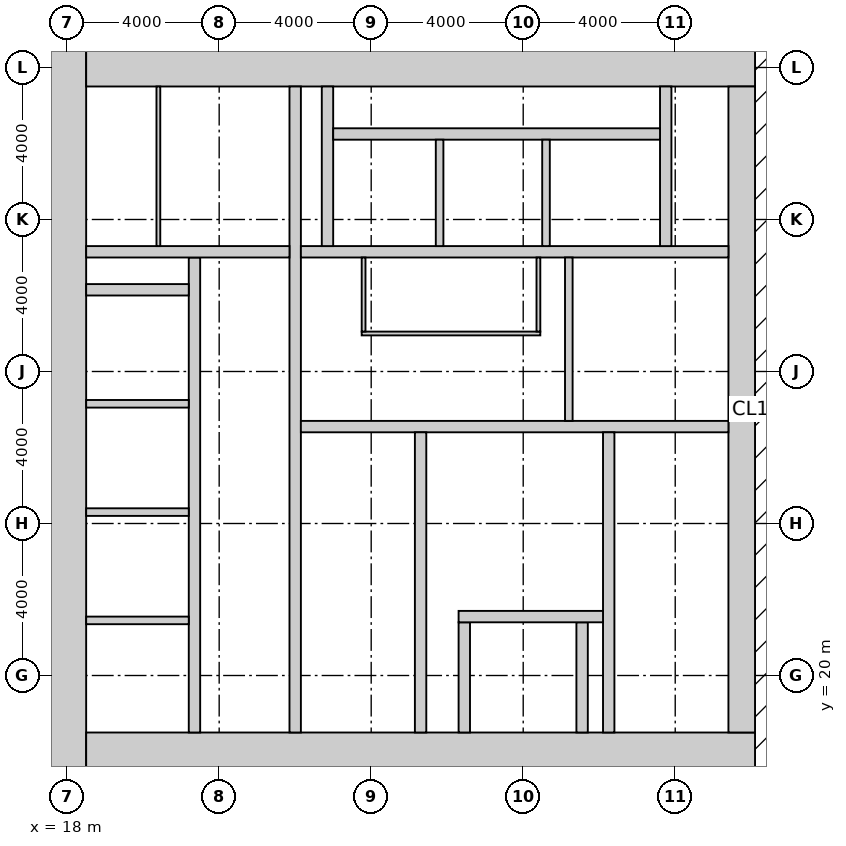
"""IFC4 building model, lengths in metres.
Left out: names, types, materials, properties, quantities, classifications, styles, units other than length and angle.
Written with IfcOpenShell. Run it as: python <this file> out.ifc"""

import sys

from ifc_helpers import new_model, si_unit, direction, frame, frame_2d, origin, place, context, subcontext, project, spatial, rectangle, extrude, element, fill, save


model = new_model("IFC4")
c1 = context("Model", 3, precision=1e-05, world=origin(), true_north=direction((0.0, 1.0)))
c2 = subcontext(c1, "Body", "Model", "MODEL_VIEW")
j1 = project(units=[si_unit("LENGTHUNIT", "METRE"), si_unit("PLANEANGLEUNIT", "RADIAN")], contexts=[c1])
p1 = place(None, origin())
s1 = spatial("IfcSite", under=j1, at=p1, CompositionType="ELEMENT")
p2 = place(p1, origin())
s2 = spatial("IfcBuilding", under=s1, at=p2, CompositionType="ELEMENT")
p3 = place(p2, frame((0.0, 0.0, 187.8)))
s3 = spatial("IfcBuildingStorey", under=s2, at=p3, CompositionType="ELEMENT", Elevation=187.8)
p4 = place(p3, frame((18.0, 17.5, -0.15), z_axis=(0.0, 0.0, 1.0), x_axis=(0.0, 1.0, 0.0)))
e1 = element("IfcWall", 1, at=p4, inside=s3, PredefinedType="SHEAR", context=c2, shape_type="SweptSolid", body=[
    extrude(rectangle(XDim=19.0, YDim=1.0, at=frame_2d((9.5, 0.0))), origin(), (0.0, 0.0, 1.0), 4.0),
])
p5 = place(p3, frame((18.5, 18.0, -0.15), z_axis=(0.0, 0.0, 1.0), x_axis=(1.0, 0.0, 0.0)))
e2 = element("IfcWall", 2, at=p5, inside=s3, PredefinedType="SHEAR", context=c2, shape_type="SweptSolid", body=[
    extrude(rectangle(XDim=17.6, YDim=1.0, at=frame_2d((8.8, 0.0))), origin(), (0.0, 0.0, 1.0), 4.0),
])
p6 = place(p5, frame((3.45, 0.0, 0.15)))
e3 = element("IfcOpeningElement", 3, at=p6, cuts=e2, PredefinedType="OPENING", context=c2, shape_type="SweptSolid", body=[
    extrude(rectangle(XDim=1.5, YDim=2.4, at=frame_2d((0.75, 1.2))), frame((0.0, 0.51, 0.0), z_axis=(0.0, -1.0, 0.0), x_axis=(1.0, 0.0, 0.0)), (0.0, 0.0, 1.0), 1.02),
])
p7 = place(p3, frame((18.5, 36.0, -0.15), z_axis=(0.0, 0.0, 1.0), x_axis=(1.0, 0.0, 0.0)))
e4 = element("IfcWall", 4, at=p7, inside=s3, PredefinedType="SHEAR", context=c2, shape_type="SweptSolid", body=[
    extrude(rectangle(XDim=17.6, YDim=1.0, at=frame_2d((8.8, 0.0))), origin(), (0.0, 0.0, 1.0), 4.0),
])
p8 = place(p3, frame((35.75, 18.5, -0.15), z_axis=(0.0, 0.0, 1.0), x_axis=(0.0, 1.0, 0.0)))
e5 = element("IfcWall", 5, at=p8, inside=s3, PredefinedType="SHEAR", context=c2, shape_type="SweptSolid", body=[
    extrude(rectangle(XDim=17.0, YDim=0.7, at=frame_2d((8.5, 0.0))), origin(), (0.0, 0.0, 1.0), 4.0),
])
p9 = place(p8, frame((9.85, 0.0, 0.15)))
e6 = element("IfcOpeningElement", 6, at=p9, cuts=e5, PredefinedType="OPENING", context=c2, shape_type="SweptSolid", body=[
    extrude(rectangle(XDim=1.0, YDim=2.2, at=frame_2d((0.5, 1.1))), frame((0.0, 0.36, 0.0), z_axis=(0.0, -1.0, 0.0), x_axis=(1.0, 0.0, 0.0)), (0.0, 0.0, 1.0), 0.72),
])
p10 = place(p3, frame((24.0, 18.5, -0.15), z_axis=(0.0, 0.0, 1.0), x_axis=(0.0, 1.0, 0.0)))
e7 = element("IfcWall", 7, at=p10, inside=s3, PredefinedType="SHEAR", context=c2, shape_type="SweptSolid", body=[
    extrude(rectangle(XDim=17.0, YDim=0.3, at=frame_2d((8.5, 0.0))), origin(), (0.0, 0.0, 1.0), 4.0),
])
p11 = place(p10, frame((9.6, 0.0, 0.15)))
e8 = element("IfcOpeningElement", 8, at=p11, cuts=e7, PredefinedType="OPENING", context=c2, shape_type="SweptSolid", body=[
    extrude(rectangle(XDim=1.5, YDim=2.4, at=frame_2d((0.75, 1.2))), frame((0.0, 0.16, 0.0), z_axis=(0.0, -1.0, 0.0), x_axis=(1.0, 0.0, 0.0)), (0.0, 0.0, 1.0), 0.32),
])
p12 = place(p3, frame((24.15, 26.55, -0.15), z_axis=(0.0, 0.0, 1.0), x_axis=(1.0, 0.0, 0.0)))
e9 = element("IfcWall", 9, at=p12, inside=s3, PredefinedType="SHEAR", context=c2, shape_type="SweptSolid", body=[
    extrude(rectangle(XDim=11.25, YDim=0.3, at=frame_2d((5.625, 0.0))), origin(), (0.0, 0.0, 1.0), 4.0),
])
p13 = place(p12, frame((9.25, 0.0, 0.15)))
e10 = element("IfcOpeningElement", 10, at=p13, cuts=e9, PredefinedType="OPENING", context=c2, shape_type="SweptSolid", body=[
    extrude(rectangle(XDim=1.0, YDim=2.2, at=frame_2d((0.5, 1.1))), frame((0.0, 0.16, 0.0), z_axis=(0.0, -1.0, 0.0), x_axis=(1.0, 0.0, 0.0)), (0.0, 0.0, 1.0), 0.32),
])
p14 = place(p12, frame((4.9, 0.0, 0.15)))
e11 = element("IfcOpeningElement", 11, at=p14, cuts=e9, PredefinedType="OPENING", context=c2, shape_type="SweptSolid", body=[
    extrude(rectangle(XDim=1.5, YDim=2.4, at=frame_2d((0.75, 1.2))), frame((0.0, 0.16, 0.0), z_axis=(0.0, -1.0, 0.0), x_axis=(1.0, 0.0, 0.0)), (0.0, 0.0, 1.0), 0.32),
])
p15 = place(p3, frame((27.3, 18.5, -0.15), z_axis=(0.0, 0.0, 1.0), x_axis=(0.0, 1.0, 0.0)))
e12 = element("IfcWall", 12, at=p15, inside=s3, PredefinedType="SHEAR", context=c2, shape_type="SweptSolid", body=[
    extrude(rectangle(XDim=7.9, YDim=0.3, at=frame_2d((3.95, 0.0))), origin(), (0.0, 0.0, 1.0), 4.0),
])
p16 = place(p15, frame((6.4, 0.0, 0.15)))
e13 = element("IfcOpeningElement", 13, at=p16, cuts=e12, PredefinedType="OPENING", context=c2, shape_type="SweptSolid", body=[
    extrude(rectangle(XDim=1.0, YDim=2.2, at=frame_2d((0.5, 1.1))), frame((0.0, 0.16, 0.0), z_axis=(0.0, -1.0, 0.0), x_axis=(1.0, 0.0, 0.0)), (0.0, 0.0, 1.0), 0.32),
])
p17 = place(p3, frame((32.25, 18.5, -0.15), z_axis=(0.0, 0.0, 1.0), x_axis=(0.0, 1.0, 0.0)))
e14 = element("IfcWall", 14, at=p17, inside=s3, PredefinedType="SHEAR", context=c2, shape_type="SweptSolid", body=[
    extrude(rectangle(XDim=7.9, YDim=0.3, at=frame_2d((3.95, 0.0))), origin(), (0.0, 0.0, 1.0), 4.0),
])
for number, where, z_axis, x_axis in (
    (15, (28.45, 18.5, -0.15), (0.0, 0.0, 1.0), (0.0, 1.0, 0.0)),
    (16, (31.55, 18.5, -0.15), (0.0, 0.0, 1.0), (0.0, 1.0, 0.0)),
):
    element("IfcWall", number, at=place(p3, frame(where, z_axis=z_axis, x_axis=x_axis)), inside=s3, PredefinedType="SHEAR", context=c2, shape_type="SweptSolid", body=[
        extrude(rectangle(XDim=2.9, YDim=0.3, at=frame_2d((1.45, 0.0))), origin(), (0.0, 0.0, 1.0), 4.0),
    ])
p18 = place(p3, frame((28.3, 21.55, -0.15), z_axis=(0.0, 0.0, 1.0), x_axis=(1.0, 0.0, 0.0)))
e17 = element("IfcWall", 17, at=p18, inside=s3, PredefinedType="SHEAR", context=c2, shape_type="SweptSolid", body=[
    extrude(rectangle(XDim=3.8, YDim=0.3, at=frame_2d((1.9, 0.0))), origin(), (0.0, 0.0, 1.0), 4.0),
])
p19 = place(p18, frame((1.05, 0.0, 0.15)))
e18 = element("IfcOpeningElement", 18, at=p19, cuts=e17, PredefinedType="OPENING", context=c2, shape_type="SweptSolid", body=[
    extrude(rectangle(XDim=1.3, YDim=2.4, at=frame_2d((0.65, 1.2))), frame((0.0, 0.16, 0.0), z_axis=(0.0, -1.0, 0.0), x_axis=(1.0, 0.0, 0.0)), (0.0, 0.0, 1.0), 0.32),
])
p20 = place(p3, frame((24.15, 31.15, -0.15), z_axis=(0.0, 0.0, 1.0), x_axis=(1.0, 0.0, 0.0)))
e19 = element("IfcWall", 19, at=p20, inside=s3, PredefinedType="SHEAR", context=c2, shape_type="SweptSolid", body=[
    extrude(rectangle(XDim=11.25, YDim=0.3, at=frame_2d((5.625, 0.0))), origin(), (0.0, 0.0, 1.0), 4.0),
])
p21 = place(p20, frame((7.25, 0.0, 0.15)))
e20 = element("IfcOpeningElement", 20, at=p21, cuts=e19, PredefinedType="OPENING", context=c2, shape_type="SweptSolid", body=[
    extrude(rectangle(XDim=1.4, YDim=2.4, at=frame_2d((0.7, 1.2))), frame((0.0, 0.16, 0.0), z_axis=(0.0, -1.0, 0.0), x_axis=(1.0, 0.0, 0.0)), (0.0, 0.0, 1.0), 0.32),
])
p22 = place(p3, frame((21.35, 18.5, -0.15), z_axis=(0.0, 0.0, 1.0), x_axis=(0.0, 1.0, 0.0)))
e21 = element("IfcWall", 21, at=p22, inside=s3, PredefinedType="SHEAR", context=c2, shape_type="SweptSolid", body=[
    extrude(rectangle(XDim=12.5, YDim=0.3, at=frame_2d((6.25, 0.0))), origin(), (0.0, 0.0, 1.0), 4.0),
])
p23 = place(p22, frame((0.875, 0.0, 0.15)))
e22 = element("IfcOpeningElement", 22, at=p23, cuts=e21, PredefinedType="OPENING", context=c2, shape_type="SweptSolid", body=[
    extrude(rectangle(XDim=1.1, YDim=2.2, at=frame_2d((0.55, 1.1))), frame((0.0, 0.16, 0.0), z_axis=(0.0, -1.0, 0.0), x_axis=(1.0, 0.0, 0.0)), (0.0, 0.0, 1.0), 0.32),
])
p24 = place(p22, frame((3.825, 0.0, 0.15)))
e23 = element("IfcOpeningElement", 23, at=p24, cuts=e21, PredefinedType="OPENING", context=c2, shape_type="SweptSolid", body=[
    extrude(rectangle(XDim=1.1, YDim=2.2, at=frame_2d((0.55, 1.1))), frame((0.0, 0.16, 0.0), z_axis=(0.0, -1.0, 0.0), x_axis=(1.0, 0.0, 0.0)), (0.0, 0.0, 1.0), 0.32),
])
p25 = place(p22, frame((6.675, 0.0, 0.15)))
e24 = element("IfcOpeningElement", 24, at=p25, cuts=e21, PredefinedType="OPENING", context=c2, shape_type="SweptSolid", body=[
    extrude(rectangle(XDim=1.1, YDim=2.2, at=frame_2d((0.55, 1.1))), frame((0.0, 0.16, 0.0), z_axis=(0.0, -1.0, 0.0), x_axis=(1.0, 0.0, 0.0)), (0.0, 0.0, 1.0), 0.32),
])
p26 = place(p22, frame((9.575, 0.0, 0.15)))
e25 = element("IfcOpeningElement", 25, at=p26, cuts=e21, PredefinedType="OPENING", context=c2, shape_type="SweptSolid", body=[
    extrude(rectangle(XDim=1.1, YDim=2.2, at=frame_2d((0.55, 1.1))), frame((0.0, 0.16, 0.0), z_axis=(0.0, -1.0, 0.0), x_axis=(1.0, 0.0, 0.0)), (0.0, 0.0, 1.0), 0.32),
])
p27 = place(p3, frame((18.5, 31.15, -0.15), z_axis=(0.0, 0.0, 1.0), x_axis=(1.0, 0.0, 0.0)))
e26 = element("IfcWall", 26, at=p27, inside=s3, PredefinedType="SHEAR", context=c2, shape_type="SweptSolid", body=[
    extrude(rectangle(XDim=5.35, YDim=0.3, at=frame_2d((2.675, 0.0))), origin(), (0.0, 0.0, 1.0), 4.0),
])
p28 = place(p27, frame((3.4, 0.0, 0.15)))
e27 = element("IfcOpeningElement", 27, at=p28, cuts=e26, PredefinedType="OPENING", context=c2, shape_type="SweptSolid", body=[
    extrude(rectangle(XDim=1.0, YDim=2.2, at=frame_2d((0.5, 1.1))), frame((0.0, 0.16, 0.0), z_axis=(0.0, -1.0, 0.0), x_axis=(1.0, 0.0, 0.0)), (0.0, 0.0, 1.0), 0.32),
])
p29 = place(p3, frame((18.5, 30.15, -0.15), z_axis=(0.0, 0.0, 1.0), x_axis=(1.0, 0.0, 0.0)))
e28 = element("IfcWall", 28, at=p29, inside=s3, PredefinedType="SHEAR", context=c2, shape_type="SweptSolid", body=[
    extrude(rectangle(XDim=2.7, YDim=0.3, at=frame_2d((1.35, 0.0))), origin(), (0.0, 0.0, 1.0), 4.0),
])
for number, where, z_axis, x_axis in (
    (29, (24.85, 31.3, -0.15), (0.0, 0.0, 1.0), (0.0, 1.0, 0.0)),
    (30, (33.75, 31.3, -0.15), (0.0, 0.0, 1.0), (0.0, 1.0, 0.0)),
):
    element("IfcWall", number, at=place(p3, frame(where, z_axis=z_axis, x_axis=x_axis)), inside=s3, PredefinedType="SHEAR", context=c2, shape_type="SweptSolid", body=[
        extrude(rectangle(XDim=4.2, YDim=0.3, at=frame_2d((2.1, 0.0))), origin(), (0.0, 0.0, 1.0), 4.0),
    ])
p30 = place(p3, frame((25.0, 34.25, -0.15), z_axis=(0.0, 0.0, 1.0), x_axis=(1.0, 0.0, 0.0)))
e31 = element("IfcWall", 31, at=p30, inside=s3, PredefinedType="SHEAR", context=c2, shape_type="SweptSolid", body=[
    extrude(rectangle(XDim=8.6, YDim=0.3, at=frame_2d((4.3, 0.0))), origin(), (0.0, 0.0, 1.0), 4.0),
])
for number, where, z_axis, x_axis in (
    (32, (27.8, 31.3, -0.15), (0.0, 0.0, 1.0), (0.0, 1.0, 0.0)),
    (33, (30.6, 31.3, -0.15), (0.0, 0.0, 1.0), (0.0, 1.0, 0.0)),
):
    element("IfcWall", number, at=place(p3, frame(where, z_axis=z_axis, x_axis=x_axis)), inside=s3, PredefinedType="SOLIDWALL", context=c2, shape_type="SweptSolid", body=[
        extrude(rectangle(XDim=2.8, YDim=0.2, at=frame_2d((1.4, 0.0))), origin(), (0.0, 0.0, 1.0), 4.0),
    ])
for number, where, z_axis, x_axis in (
    (34, (18.5, 21.45, -0.15), (0.0, 0.0, 1.0), (1.0, 0.0, 0.0)),
    (35, (18.5, 24.3, -0.15), (0.0, 0.0, 1.0), (1.0, 0.0, 0.0)),
    (36, (18.5, 27.15, -0.15), (0.0, 0.0, 1.0), (1.0, 0.0, 0.0)),
):
    element("IfcWall", number, at=place(p3, frame(where, z_axis=z_axis, x_axis=x_axis)), inside=s3, PredefinedType="SOLIDWALL", context=c2, shape_type="SweptSolid", body=[
        extrude(rectangle(XDim=2.7, YDim=0.2, at=frame_2d((1.35, 0.0))), origin(), (0.0, 0.0, 1.0), 4.0),
    ])
p31 = place(p3, frame((31.2, 26.7, 0.0), z_axis=(0.0, 0.0, 1.0), x_axis=(0.0, 1.0, 0.0)))
e37 = element("IfcWall", 37, at=p31, inside=s3, PredefinedType="SOLIDWALL", context=c2, shape_type="SweptSolid", body=[
    extrude(rectangle(XDim=4.3, YDim=0.2, at=frame_2d((2.15, 0.0))), origin(), (0.0, 0.0, 1.0), 3.85),
])
p32 = place(p3, frame((20.4, 31.3, 0.0), z_axis=(0.0, 0.0, 1.0), x_axis=(0.0, 1.0, 0.0)))
e38 = element("IfcWall", 38, at=p32, inside=s3, PredefinedType="PARTITIONING", context=c2, shape_type="SweptSolid", body=[
    extrude(rectangle(XDim=4.2, YDim=0.1, at=frame_2d((2.1, 0.0))), origin(), (0.0, 0.0, 1.0), 3.85),
])
p33 = place(p32, frame((1.55, 0.0, 0.0)))
e39 = element("IfcOpeningElement", 39, at=p33, cuts=e38, PredefinedType="OPENING", context=c2, shape_type="SweptSolid", body=[
    extrude(rectangle(XDim=1.0, YDim=2.2, at=frame_2d((0.5, 1.1))), frame((0.0, 0.06, 0.0), z_axis=(0.0, -1.0, 0.0), x_axis=(1.0, 0.0, 0.0)), (0.0, 0.0, 1.0), 0.12),
])
p34 = place(p3, frame((25.75, 29.0, 0.0), z_axis=(0.0, 0.0, 1.0), x_axis=(1.0, 0.0, 0.0)))
e40 = element("IfcWall", 40, at=p34, inside=s3, PredefinedType="PARTITIONING", context=c2, shape_type="SweptSolid", body=[
    extrude(rectangle(XDim=4.7, YDim=0.1, at=frame_2d((2.35, 0.0))), origin(), (0.0, 0.0, 1.0), 3.85),
])
p35 = place(p34, frame((1.85, 0.0, 0.0)))
e41 = element("IfcOpeningElement", 41, at=p35, cuts=e40, PredefinedType="OPENING", context=c2, shape_type="SweptSolid", body=[
    extrude(rectangle(XDim=1.0, YDim=2.2, at=frame_2d((0.5, 1.1))), frame((0.0, 0.06, 0.0), z_axis=(0.0, -1.0, 0.0), x_axis=(1.0, 0.0, 0.0)), (0.0, 0.0, 1.0), 0.12),
])
for number, where, z_axis, x_axis in (
    (42, (25.8, 29.05, 0.0), (0.0, 0.0, 1.0), (0.0, 1.0, 0.0)),
    (43, (30.4, 29.05, 0.0), (0.0, 0.0, 1.0), (0.0, 1.0, 0.0)),
):
    element("IfcWall", number, at=place(p3, frame(where, z_axis=z_axis, x_axis=x_axis)), inside=s3, PredefinedType="PARTITIONING", context=c2, shape_type="SweptSolid", body=[
        extrude(rectangle(XDim=1.95, YDim=0.1, at=frame_2d((0.975, 0.0))), origin(), (0.0, 0.0, 1.0), 3.85),
    ])
p36 = place(p16, origin())
e44 = element("IfcDoor", 44, at=p36, inside=s3, OperationType="SINGLE_SWING_RIGHT", PredefinedType="DOOR", context=c2, shape_type="SweptSolid", body=[
    extrude(rectangle(XDim=1.0, YDim=2.2, at=frame_2d((0.5, 1.1))), frame((0.0, 0.025, 0.0), z_axis=(0.0, -1.0, 0.0), x_axis=(1.0, 0.0, 0.0)), (0.0, 0.0, 1.0), 0.05),
])
fill(e13, e44)
p37 = place(p13, frame((1.0, 0.0, 0.0), z_axis=(0.0, 0.0, 1.0), x_axis=(-1.0, 0.0, 0.0)))
e45 = element("IfcDoor", 45, at=p37, inside=s3, OperationType="SINGLE_SWING_RIGHT", PredefinedType="DOOR", context=c2, shape_type="SweptSolid", body=[
    extrude(rectangle(XDim=1.0, YDim=2.2, at=frame_2d((0.5, 1.1))), frame((0.0, 0.025, 0.0), z_axis=(0.0, -1.0, 0.0), x_axis=(1.0, 0.0, 0.0)), (0.0, 0.0, 1.0), 0.05),
])
fill(e10, e45)
p38 = place(p9, origin())
e46 = element("IfcDoor", 46, at=p38, inside=s3, OperationType="SINGLE_SWING_RIGHT", PredefinedType="DOOR", context=c2, shape_type="SweptSolid", body=[
    extrude(rectangle(XDim=1.0, YDim=2.2, at=frame_2d((0.5, 1.1))), frame((0.0, 0.025, 0.0), z_axis=(0.0, -1.0, 0.0), x_axis=(1.0, 0.0, 0.0)), (0.0, 0.0, 1.0), 0.05),
])
fill(e6, e46)
p39 = place(p14, origin())
e47 = element("IfcDoor", 47, at=p39, inside=s3, OperationType="DOUBLE_DOOR_DOUBLE_SWING", PredefinedType="DOOR", context=c2, shape_type="SweptSolid", body=[
    extrude(rectangle(XDim=1.5, YDim=2.4, at=frame_2d((0.75, 1.2))), frame((0.0, 0.025, 0.0), z_axis=(0.0, -1.0, 0.0), x_axis=(1.0, 0.0, 0.0)), (0.0, 0.0, 1.0), 0.05),
])
fill(e11, e47)
p40 = place(p11, origin())
e48 = element("IfcDoor", 48, at=p40, inside=s3, OperationType="DOUBLE_DOOR_DOUBLE_SWING", PredefinedType="DOOR", context=c2, shape_type="SweptSolid", body=[
    extrude(rectangle(XDim=1.5, YDim=2.4, at=frame_2d((0.75, 1.2))), frame((0.0, 0.025, 0.0), z_axis=(0.0, -1.0, 0.0), x_axis=(1.0, 0.0, 0.0)), (0.0, 0.0, 1.0), 0.05),
])
fill(e8, e48)
p41 = place(p28, origin())
e49 = element("IfcDoor", 49, at=p41, inside=s3, OperationType="SINGLE_SWING_LEFT", PredefinedType="DOOR", context=c2, shape_type="SweptSolid", body=[
    extrude(rectangle(XDim=1.0, YDim=2.2, at=frame_2d((0.5, 1.1))), frame((0.0, 0.025, 0.0), z_axis=(0.0, -1.0, 0.0), x_axis=(1.0, 0.0, 0.0)), (0.0, 0.0, 1.0), 0.05),
])
fill(e27, e49)
p42 = place(p33, origin())
e50 = element("IfcDoor", 50, at=p42, inside=s3, OperationType="SINGLE_SWING_LEFT", PredefinedType="DOOR", context=c2, shape_type="SweptSolid", body=[
    extrude(rectangle(XDim=1.0, YDim=2.2, at=frame_2d((0.5, 1.1))), frame((0.0, 0.025, 0.0), z_axis=(0.0, -1.0, 0.0), x_axis=(1.0, 0.0, 0.0)), (0.0, 0.0, 1.0), 0.05),
])
fill(e39, e50)
p43 = place(p35, origin())
e51 = element("IfcDoor", 51, at=p43, inside=s3, OperationType="SINGLE_SWING_LEFT", PredefinedType="DOOR", context=c2, shape_type="SweptSolid", body=[
    extrude(rectangle(XDim=1.0, YDim=2.2, at=frame_2d((0.5, 1.1))), frame((0.0, 0.025, 0.0), z_axis=(0.0, -1.0, 0.0), x_axis=(1.0, 0.0, 0.0)), (0.0, 0.0, 1.0), 0.05),
])
fill(e41, e51)
p44 = place(p6, origin())
e52 = element("IfcDoor", 52, at=p44, inside=s3, OperationType="DOUBLE_DOOR_DOUBLE_SWING", PredefinedType="DOOR", context=c2, shape_type="SweptSolid", body=[
    extrude(rectangle(XDim=1.5, YDim=2.4, at=frame_2d((0.75, 1.2))), frame((0.0, 0.025, 0.0), z_axis=(0.0, -1.0, 0.0), x_axis=(1.0, 0.0, 0.0)), (0.0, 0.0, 1.0), 0.05),
])
fill(e3, e52)
p45 = place(p19, origin())
e53 = element("IfcDoor", 53, at=p45, inside=s3, OperationType="DOUBLE_DOOR_SLIDING", PredefinedType="DOOR", context=c2, shape_type="SweptSolid", body=[
    extrude(rectangle(XDim=1.3, YDim=2.4, at=frame_2d((0.65, 1.2))), frame((0.0, 0.025, 0.0), z_axis=(0.0, -1.0, 0.0), x_axis=(1.0, 0.0, 0.0)), (0.0, 0.0, 1.0), 0.05),
])
fill(e18, e53)
p46 = place(p21, origin())
e54 = element("IfcDoor", 54, at=p46, inside=s3, OperationType="DOUBLE_DOOR_SLIDING", PredefinedType="DOOR", context=c2, shape_type="SweptSolid", body=[
    extrude(rectangle(XDim=1.4, YDim=2.4, at=frame_2d((0.7, 1.2))), frame((0.0, 0.025, 0.0), z_axis=(0.0, -1.0, 0.0), x_axis=(1.0, 0.0, 0.0)), (0.0, 0.0, 1.0), 0.05),
])
fill(e20, e54)
p47 = place(p23, origin())
e55 = element("IfcDoor", 55, at=p47, inside=s3, OperationType="DOUBLE_DOOR_SLIDING", PredefinedType="DOOR", context=c2, shape_type="SweptSolid", body=[
    extrude(rectangle(XDim=1.1, YDim=2.2, at=frame_2d((0.55, 1.1))), frame((0.0, 0.025, 0.0), z_axis=(0.0, -1.0, 0.0), x_axis=(1.0, 0.0, 0.0)), (0.0, 0.0, 1.0), 0.05),
])
fill(e22, e55)
p48 = place(p24, origin())
e56 = element("IfcDoor", 56, at=p48, inside=s3, OperationType="DOUBLE_DOOR_SLIDING", PredefinedType="DOOR", context=c2, shape_type="SweptSolid", body=[
    extrude(rectangle(XDim=1.1, YDim=2.2, at=frame_2d((0.55, 1.1))), frame((0.0, 0.025, 0.0), z_axis=(0.0, -1.0, 0.0), x_axis=(1.0, 0.0, 0.0)), (0.0, 0.0, 1.0), 0.05),
])
fill(e23, e56)
p49 = place(p25, origin())
e57 = element("IfcDoor", 57, at=p49, inside=s3, OperationType="DOUBLE_DOOR_SLIDING", PredefinedType="DOOR", context=c2, shape_type="SweptSolid", body=[
    extrude(rectangle(XDim=1.1, YDim=2.2, at=frame_2d((0.55, 1.1))), frame((0.0, 0.025, 0.0), z_axis=(0.0, -1.0, 0.0), x_axis=(1.0, 0.0, 0.0)), (0.0, 0.0, 1.0), 0.05),
])
fill(e24, e57)
p50 = place(p26, origin())
e58 = element("IfcDoor", 58, at=p50, inside=s3, OperationType="DOUBLE_DOOR_SLIDING", PredefinedType="DOOR", context=c2, shape_type="SweptSolid", body=[
    extrude(rectangle(XDim=1.1, YDim=2.2, at=frame_2d((0.55, 1.1))), frame((0.0, 0.025, 0.0), z_axis=(0.0, -1.0, 0.0), x_axis=(1.0, 0.0, 0.0)), (0.0, 0.0, 1.0), 0.05),
])
fill(e25, e58)
save(model, sys.argv[1])
